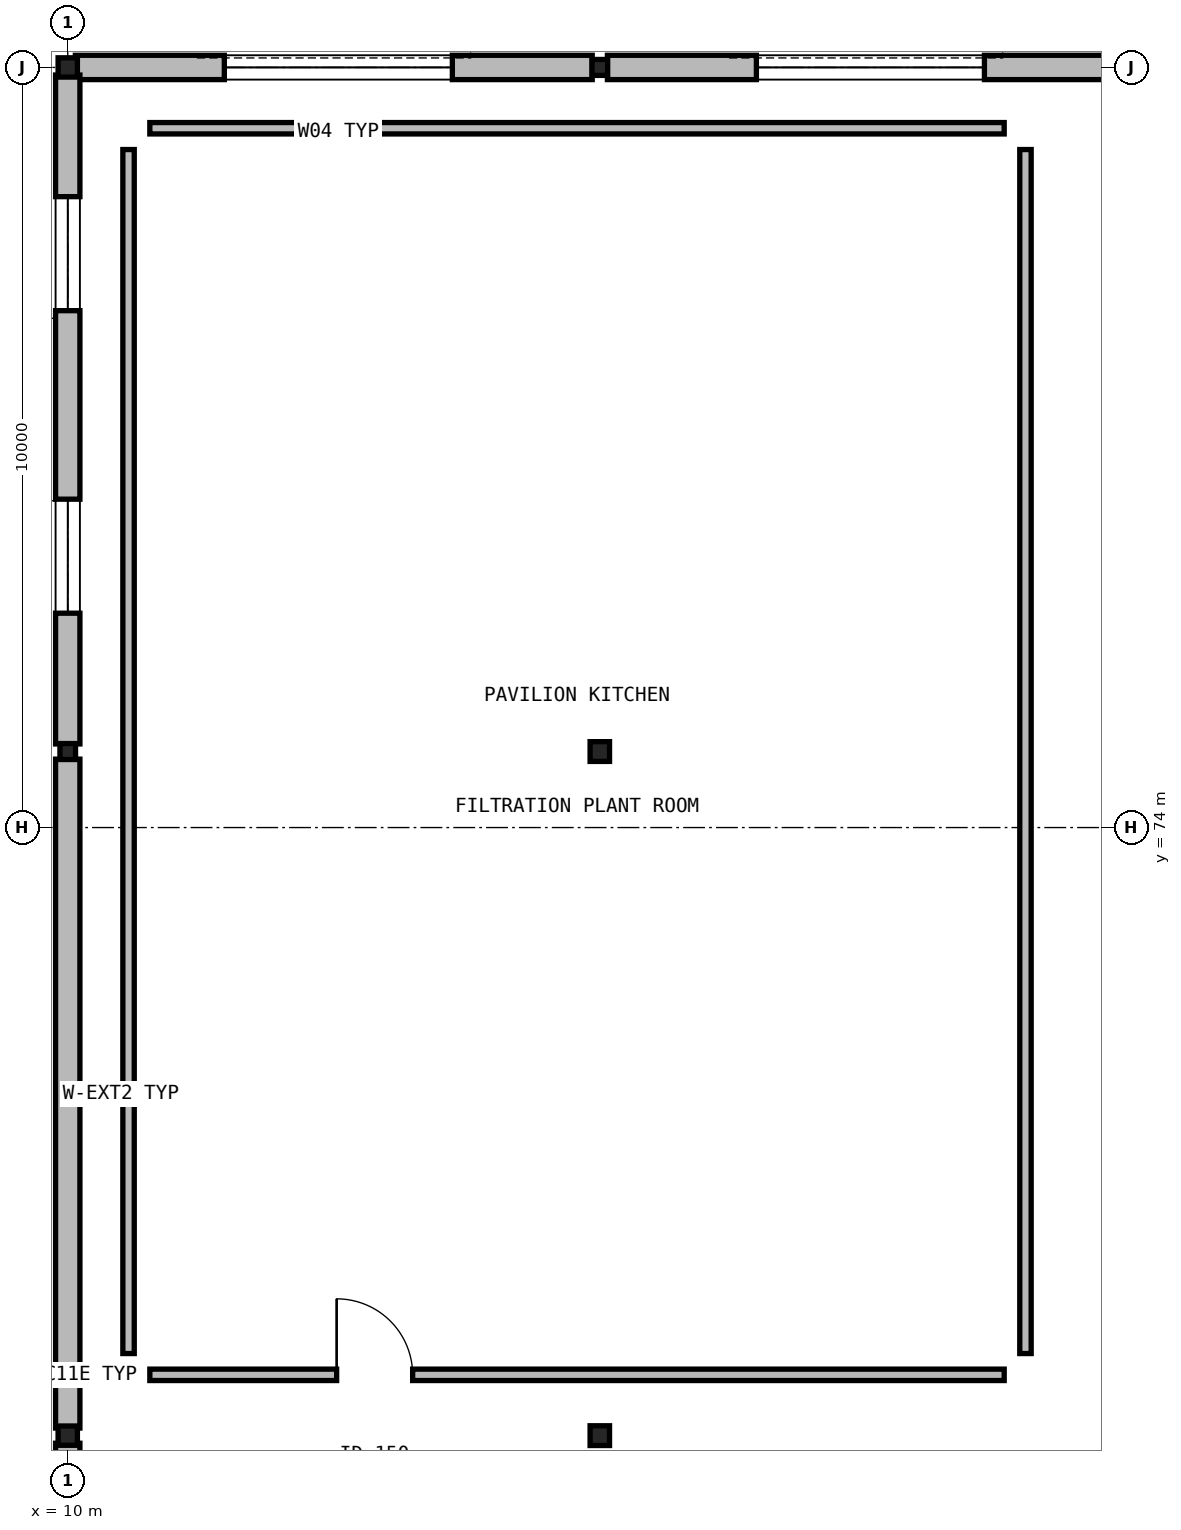
"""IFC4 building model, lengths in metres.
Left out: names, types, materials, properties, quantities, classifications, styles, units other than length and angle.
Written with IfcOpenShell. Run it as: python <this file> out.ifc"""

import sys

from ifc_helpers import new_model, si_unit, direction, frame, frame_2d, origin, origin_2d_with_axis, place, context, subcontext, project, spatial, rectangle, i_section, extrude, element, fill, save


model = new_model("IFC4")
c1 = context("Model", 3, precision=1e-05, world=origin(), true_north=direction((0.0, 1.0)))
c2 = subcontext(c1, "Body", "Model", "MODEL_VIEW")
j1 = project(units=[si_unit("LENGTHUNIT", "METRE"), si_unit("PLANEANGLEUNIT", "RADIAN")], contexts=[c1])
p1 = place(None, origin())
s1 = spatial("IfcSite", under=j1, at=p1, CompositionType="ELEMENT")
p2 = place(p1, origin())
s2 = spatial("IfcBuilding", under=s1, at=p2, CompositionType="ELEMENT")
p3 = place(p2, frame((0.0, 0.0, 4.5)))
s3 = spatial("IfcBuildingStorey", under=s2, at=p3, CompositionType="ELEMENT", Elevation=4.5)
p4 = place(p3, frame((10.0, 66.0, 0.0), z_axis=(0.0, 0.0, 1.0), x_axis=(1.0, 0.0, 0.0)))
e1 = element("IfcColumn", 1, at=p4, inside=s3, PredefinedType="COLUMN", context=c2, shape_type="SweptSolid", body=[
    extrude(i_section(OverallWidth=0.254, OverallDepth=0.254, WebThickness=0.009, FlangeThickness=0.014, FilletRadius=0.014, at=origin_2d_with_axis()), origin(), (0.0, 0.0, 1.0), 3.9),
])
p5 = place(p3, frame((10.0, 75.0, 0.0), z_axis=(0.0, 0.0, 1.0), x_axis=(1.0, 0.0, 0.0)))
e2 = element("IfcColumn", 2, at=p5, inside=s3, PredefinedType="COLUMN", context=c2, shape_type="SweptSolid", body=[
    extrude(i_section(OverallWidth=0.205, OverallDepth=0.21, WebThickness=0.009, FlangeThickness=0.014, FilletRadius=0.011, at=origin_2d_with_axis()), origin(), (0.0, 0.0, 1.0), 3.9),
])
p6 = place(p3, frame((10.0, 84.0, 0.0), z_axis=(0.0, 0.0, 1.0), x_axis=(1.0, 0.0, 0.0)))
e3 = element("IfcColumn", 3, at=p6, inside=s3, PredefinedType="COLUMN", context=c2, shape_type="SweptSolid", body=[
    extrude(i_section(OverallWidth=0.254, OverallDepth=0.254, WebThickness=0.009, FlangeThickness=0.014, FilletRadius=0.014, at=origin_2d_with_axis()), origin(), (0.0, 0.0, 1.0), 3.9),
])
for number, where, z_axis, x_axis in (
    (4, (17.0, 66.0, 0.0), (0.0, 0.0, 1.0), (1.0, 0.0, 0.0)),
    (5, (17.0, 75.0, 0.0), (0.0, 0.0, 1.0), (1.0, 0.0, 0.0)),
):
    element("IfcColumn", number, at=place(p3, frame(where, z_axis=z_axis, x_axis=x_axis)), inside=s3, PredefinedType="COLUMN", context=c2, shape_type="SweptSolid", body=[
        extrude(i_section(OverallWidth=0.256, OverallDepth=0.26, WebThickness=0.01, FlangeThickness=0.017, FilletRadius=0.014, at=origin_2d_with_axis()), origin(), (0.0, 0.0, 1.0), 3.9),
    ])
p7 = place(p3, frame((17.0, 84.0, 0.0), z_axis=(0.0, 0.0, 1.0), x_axis=(1.0, 0.0, 0.0)))
e6 = element("IfcColumn", 6, at=p7, inside=s3, PredefinedType="COLUMN", context=c2, shape_type="SweptSolid", body=[
    extrude(i_section(OverallWidth=0.205, OverallDepth=0.21, WebThickness=0.009, FlangeThickness=0.014, FilletRadius=0.011, at=origin_2d_with_axis()), origin(), (0.0, 0.0, 1.0), 3.9),
])
p8 = place(p3, frame((16.9, 84.0, 0.0), z_axis=(0.0, 0.0, 1.0), x_axis=(-1.0, 0.0, 0.0)))
e7 = element("IfcWall", 7, at=p8, inside=s3, PredefinedType="SOLIDWALL", context=c2, shape_type="SweptSolid", body=[
    extrude(rectangle(XDim=6.8, YDim=0.32, at=frame_2d((3.4, 0.0), x_axis=(1.0, 0.0))), origin(), (0.0, 0.0, 1.0), 3.29),
])
p9 = place(p8, frame((1.84, 0.0, 0.85)))
e8 = element("IfcOpeningElement", 8, at=p9, cuts=e7, PredefinedType="OPENING", context=c2, shape_type="SweptSolid", body=[
    extrude(rectangle(XDim=3.0, YDim=2.15, at=frame_2d((1.5, 1.075), x_axis=(1.0, 0.0))), frame((0.0, 0.17, 0.0), z_axis=(0.0, -1.0, 0.0), x_axis=(1.0, 0.0, 0.0)), (0.0, 0.0, 1.0), 0.34),
])
p10 = place(p3, frame((23.9, 84.0, 0.0), z_axis=(0.0, 0.0, 1.0), x_axis=(-1.0, 0.0, 0.0)))
e9 = element("IfcWall", 9, at=p10, inside=s3, PredefinedType="SOLIDWALL", context=c2, shape_type="SweptSolid", body=[
    extrude(rectangle(XDim=6.8, YDim=0.32, at=frame_2d((3.4, 0.0), x_axis=(1.0, 0.0))), origin(), (0.0, 0.0, 1.0), 3.29),
])
p11 = place(p10, frame((1.84, 0.0, 0.85)))
e10 = element("IfcOpeningElement", 10, at=p11, cuts=e9, PredefinedType="OPENING", context=c2, shape_type="SweptSolid", body=[
    extrude(rectangle(XDim=3.0, YDim=2.15, at=frame_2d((1.5, 1.075), x_axis=(1.0, 0.0))), frame((0.0, 0.17, 0.0), z_axis=(0.0, -1.0, 0.0), x_axis=(1.0, 0.0, 0.0)), (0.0, 0.0, 1.0), 0.34),
])
p12 = place(p3, frame((10.0, 65.9, 0.0), z_axis=(0.0, 0.0, 1.0), x_axis=(0.0, -1.0, 0.0)))
e11 = element("IfcWall", 11, at=p12, inside=s3, PredefinedType="SOLIDWALL", context=c2, shape_type="SweptSolid", body=[
    extrude(rectangle(XDim=8.8, YDim=0.32, at=frame_2d((4.4, 0.0), x_axis=(1.0, 0.0))), origin(), (0.0, 0.0, 1.0), 3.29),
])
p13 = place(p12, frame((1.6, 0.0, 1.05)))
e12 = element("IfcOpeningElement", 12, at=p13, cuts=e11, PredefinedType="OPENING", context=c2, shape_type="SweptSolid", body=[
    extrude(rectangle(XDim=1.5, YDim=1.6, at=frame_2d((0.75, 0.8), x_axis=(1.0, 0.0))), frame((0.0, 0.17, 0.0), z_axis=(0.0, -1.0, 0.0), x_axis=(1.0, 0.0, 0.0)), (0.0, 0.0, 1.0), 0.34),
])
p14 = place(p12, frame((5.58, 0.0, 1.05)))
e13 = element("IfcOpeningElement", 13, at=p14, cuts=e11, PredefinedType="OPENING", context=c2, shape_type="SweptSolid", body=[
    extrude(rectangle(XDim=1.5, YDim=1.6, at=frame_2d((0.75, 0.8), x_axis=(1.0, 0.0))), frame((0.0, 0.17, 0.0), z_axis=(0.0, -1.0, 0.0), x_axis=(1.0, 0.0, 0.0)), (0.0, 0.0, 1.0), 0.34),
])
p15 = place(p3, frame((10.0, 74.9, 0.0), z_axis=(0.0, 0.0, 1.0), x_axis=(0.0, -1.0, 0.0)))
e14 = element("IfcWall", 14, at=p15, inside=s3, PredefinedType="SOLIDWALL", context=c2, shape_type="SweptSolid", body=[
    extrude(rectangle(XDim=8.8, YDim=0.32, at=frame_2d((4.4, 0.0), x_axis=(1.0, 0.0))), origin(), (0.0, 0.0, 1.0), 3.29),
])
p16 = place(p3, frame((10.0, 83.9, 0.0), z_axis=(0.0, 0.0, 1.0), x_axis=(0.0, -1.0, 0.0)))
e15 = element("IfcWall", 15, at=p16, inside=s3, PredefinedType="SOLIDWALL", context=c2, shape_type="SweptSolid", body=[
    extrude(rectangle(XDim=8.8, YDim=0.32, at=frame_2d((4.4, 0.0), x_axis=(1.0, 0.0))), origin(), (0.0, 0.0, 1.0), 3.29),
])
p17 = place(p16, frame((1.6, 0.0, 1.05)))
e16 = element("IfcOpeningElement", 16, at=p17, cuts=e15, PredefinedType="OPENING", context=c2, shape_type="SweptSolid", body=[
    extrude(rectangle(XDim=1.5, YDim=1.6, at=frame_2d((0.75, 0.8), x_axis=(1.0, 0.0))), frame((0.0, 0.17, 0.0), z_axis=(0.0, -1.0, 0.0), x_axis=(1.0, 0.0, 0.0)), (0.0, 0.0, 1.0), 0.34),
])
p18 = place(p16, frame((5.58, 0.0, 1.05)))
e17 = element("IfcOpeningElement", 17, at=p18, cuts=e15, PredefinedType="OPENING", context=c2, shape_type="SweptSolid", body=[
    extrude(rectangle(XDim=1.5, YDim=1.6, at=frame_2d((0.75, 0.8), x_axis=(1.0, 0.0))), frame((0.0, 0.17, 0.0), z_axis=(0.0, -1.0, 0.0), x_axis=(1.0, 0.0, 0.0)), (0.0, 0.0, 1.0), 0.34),
])
p19 = place(p3, frame((11.08, 66.8, 0.0), z_axis=(0.0, 0.0, 1.0), x_axis=(1.0, 0.0, 0.0)))
e18 = element("IfcWall", 18, at=p19, inside=s3, PredefinedType="PARTITIONING", context=c2, shape_type="SweptSolid", body=[
    extrude(rectangle(XDim=11.24, YDim=0.15, at=frame_2d((5.62, 0.0), x_axis=(1.0, 0.0))), origin(), (0.0, 0.0, 1.0), 3.03),
])
p20 = place(p19, frame((2.458, 0.0, 0.0)))
e19 = element("IfcOpeningElement", 19, at=p20, cuts=e18, PredefinedType="OPENING", context=c2, shape_type="SweptSolid", body=[
    extrude(rectangle(XDim=1.0, YDim=2.15, at=frame_2d((0.5, 1.075), x_axis=(1.0, 0.0))), frame((0.0, 0.085, 0.0), z_axis=(0.0, -1.0, 0.0), x_axis=(1.0, 0.0, 0.0)), (0.0, 0.0, 1.0), 0.17),
])
p21 = place(p3, frame((22.6, 67.08, 0.0), z_axis=(0.0, 0.0, 1.0), x_axis=(0.0, 1.0, 0.0)))
e20 = element("IfcWall", 20, at=p21, inside=s3, PredefinedType="PARTITIONING", context=c2, shape_type="SweptSolid", body=[
    extrude(rectangle(XDim=15.84, YDim=0.15, at=frame_2d((7.92, 0.0), x_axis=(1.0, 0.0))), origin(), (0.0, 0.0, 1.0), 3.03),
])
p22 = place(p3, frame((22.32, 83.2, 0.0), z_axis=(0.0, 0.0, 1.0), x_axis=(-1.0, 0.0, 0.0)))
e21 = element("IfcWall", 21, at=p22, inside=s3, PredefinedType="PARTITIONING", context=c2, shape_type="SweptSolid", body=[
    extrude(rectangle(XDim=11.24, YDim=0.15, at=frame_2d((5.62, 0.0), x_axis=(1.0, 0.0))), origin(), (0.0, 0.0, 1.0), 3.03),
])
p23 = place(p3, frame((10.8, 82.92, 0.0), z_axis=(0.0, 0.0, 1.0), x_axis=(0.0, -1.0, 0.0)))
e22 = element("IfcWall", 22, at=p23, inside=s3, PredefinedType="PARTITIONING", context=c2, shape_type="SweptSolid", body=[
    extrude(rectangle(XDim=15.84, YDim=0.15, at=frame_2d((7.92, 0.0), x_axis=(1.0, 0.0))), origin(), (0.0, 0.0, 1.0), 3.03),
])
p24 = place(p9, origin())
e23 = element("IfcWindow", 23, at=p24, inside=s3, PartitioningType="SINGLE_PANEL", PredefinedType="WINDOW", context=c2, shape_type="SweptSolid", body=[
    extrude(rectangle(XDim=3.0, YDim=2.15, at=frame_2d((1.5, 1.075), x_axis=(1.0, 0.0))), frame((0.0, 0.03, 0.0), z_axis=(0.0, -1.0, 0.0), x_axis=(1.0, 0.0, 0.0)), (0.0, 0.0, 1.0), 0.06),
])
fill(e8, e23)
p25 = place(p11, origin())
e24 = element("IfcWindow", 24, at=p25, inside=s3, PartitioningType="SINGLE_PANEL", PredefinedType="WINDOW", context=c2, shape_type="SweptSolid", body=[
    extrude(rectangle(XDim=3.0, YDim=2.15, at=frame_2d((1.5, 1.075), x_axis=(1.0, 0.0))), frame((0.0, 0.03, 0.0), z_axis=(0.0, -1.0, 0.0), x_axis=(1.0, 0.0, 0.0)), (0.0, 0.0, 1.0), 0.06),
])
fill(e10, e24)
p26 = place(p17, origin())
e25 = element("IfcWindow", 25, at=p26, inside=s3, PartitioningType="SINGLE_PANEL", PredefinedType="WINDOW", context=c2, shape_type="SweptSolid", body=[
    extrude(rectangle(XDim=1.5, YDim=1.6, at=frame_2d((0.75, 0.8), x_axis=(1.0, 0.0))), frame((0.0, 0.03, 0.0), z_axis=(0.0, -1.0, 0.0), x_axis=(1.0, 0.0, 0.0)), (0.0, 0.0, 1.0), 0.06),
])
fill(e16, e25)
p27 = place(p18, origin())
e26 = element("IfcWindow", 26, at=p27, inside=s3, PartitioningType="SINGLE_PANEL", PredefinedType="WINDOW", context=c2, shape_type="SweptSolid", body=[
    extrude(rectangle(XDim=1.5, YDim=1.6, at=frame_2d((0.75, 0.8), x_axis=(1.0, 0.0))), frame((0.0, 0.03, 0.0), z_axis=(0.0, -1.0, 0.0), x_axis=(1.0, 0.0, 0.0)), (0.0, 0.0, 1.0), 0.06),
])
fill(e17, e26)
p28 = place(p20, origin())
e27 = element("IfcDoor", 27, at=p28, inside=s3, OperationType="SINGLE_SWING_LEFT", PredefinedType="DOOR", context=c2, shape_type="SweptSolid", body=[
    extrude(rectangle(XDim=1.0, YDim=2.15, at=frame_2d((0.5, 1.075), x_axis=(1.0, 0.0))), frame((0.0, 0.025, 0.0), z_axis=(0.0, -1.0, 0.0), x_axis=(1.0, 0.0, 0.0)), (0.0, 0.0, 1.0), 0.05),
])
fill(e19, e27)
save(model, sys.argv[1])
